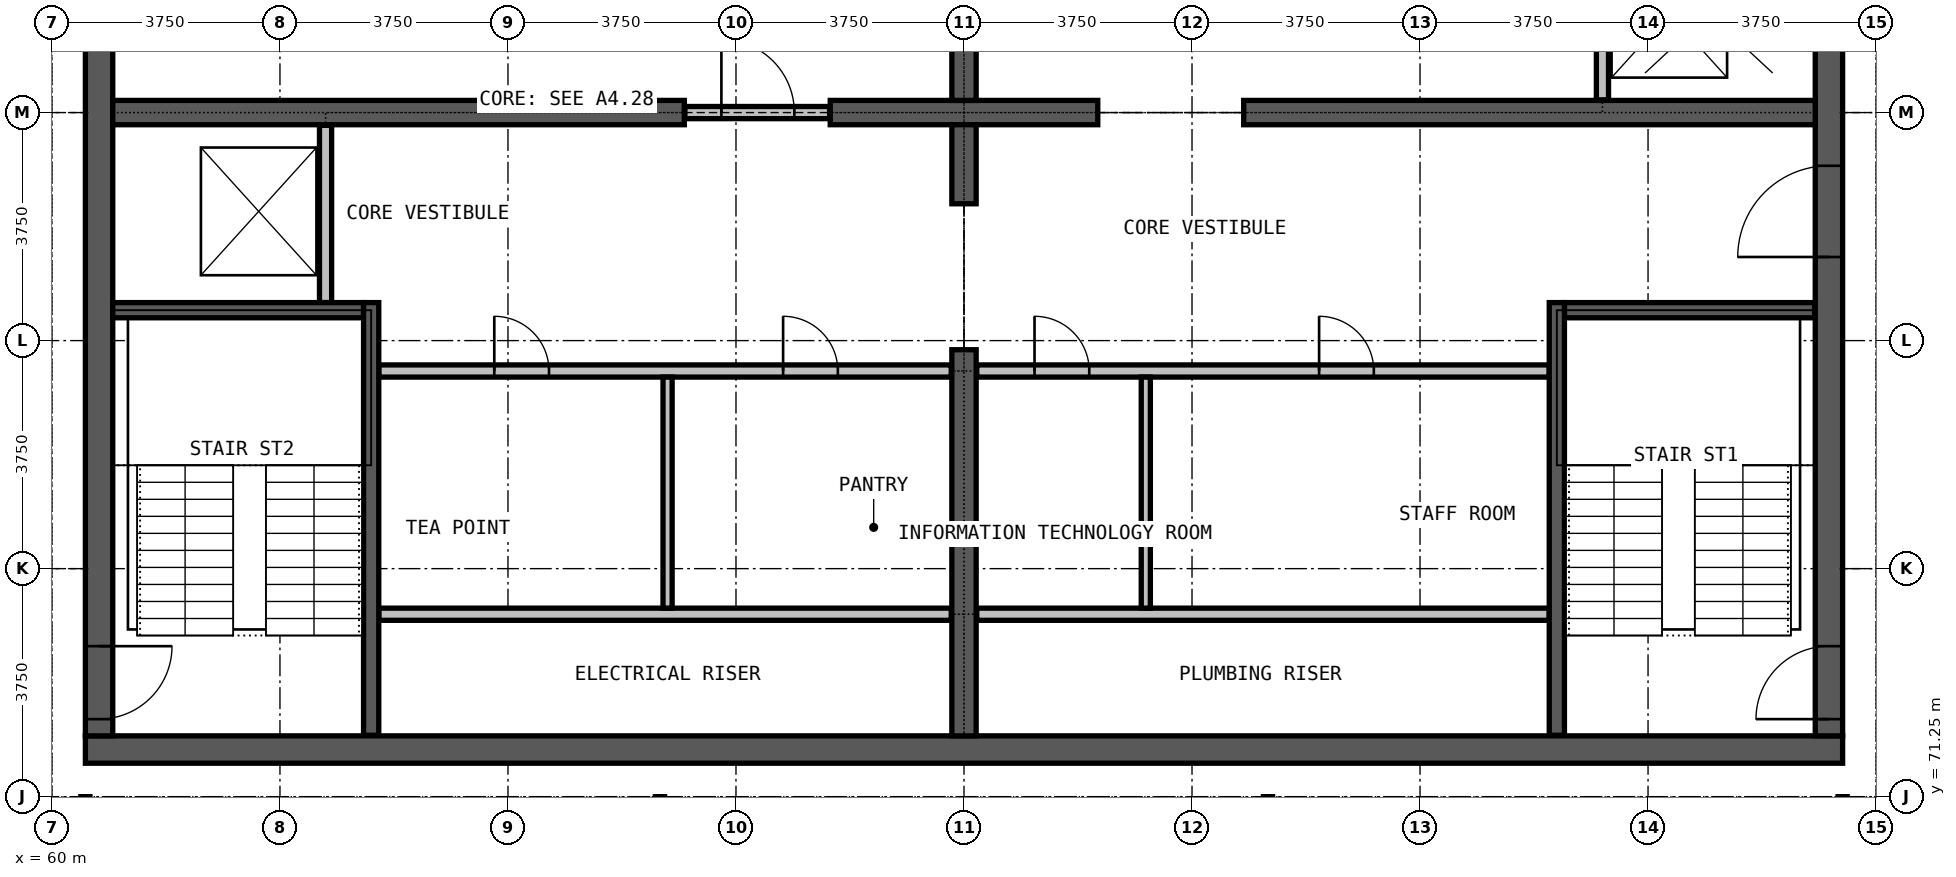
"""IFC4 building model, lengths in metres.
Left out: names, types, materials, properties, quantities, classifications, styles, units other than length and angle.
Written with IfcOpenShell. Run it as: python <this file> out.ifc"""

import sys

from ifc_helpers import new_model, si_unit, direction, frame, frame_2d, origin, place, context, subcontext, project, spatial, rectangle, extrude, element, fill, save


model = new_model("IFC4")
c1 = context("Model", 3, precision=1e-05, world=origin(), true_north=direction((0.0, 1.0)))
c2 = subcontext(c1, "Body", "Model", "MODEL_VIEW")
j1 = project(units=[si_unit("LENGTHUNIT", "METRE"), si_unit("PLANEANGLEUNIT", "RADIAN")], contexts=[c1])
p1 = place(None, origin())
s1 = spatial("IfcSite", under=j1, at=p1, CompositionType="ELEMENT")
p2 = place(p1, origin())
s2 = spatial("IfcBuilding", under=s1, at=p2, CompositionType="ELEMENT")
p3 = place(p2, frame((0.0, 0.0, 269.3)))
s3 = spatial("IfcBuildingStorey", under=s2, at=p3, CompositionType="ELEMENT", Elevation=269.3)
p4 = place(p3, frame((60.55, 72.025, 0.0), z_axis=(0.0, 0.0, 1.0), x_axis=(1.0, 0.0, 0.0)))
e1 = element("IfcWall", 1, at=p4, inside=s3, PredefinedType="SHEAR", context=c2, shape_type="SweptSolid", body=[
    extrude(rectangle(XDim=28.9, YDim=0.45, at=frame_2d((14.45, 0.0))), origin(), (0.0, 0.0, 1.0), 3.6),
])
p5 = place(p3, frame((89.225, 72.25, 0.0), z_axis=(0.0, 0.0, 1.0), x_axis=(0.0, 1.0, 0.0)))
e2 = element("IfcWall", 2, at=p5, inside=s3, PredefinedType="SHEAR", context=c2, shape_type="SweptSolid", body=[
    extrude(rectangle(XDim=20.5, YDim=0.45, at=frame_2d((10.25, 0.0))), origin(), (0.0, 0.0, 1.0), 3.6),
])
p6 = place(p5, frame((0.275, 0.0, 0.0)))
e3 = element("IfcOpeningElement", 3, at=p6, cuts=e2, PredefinedType="OPENING", context=c2, shape_type="SweptSolid", body=[
    extrude(rectangle(XDim=1.2, YDim=2.2, at=frame_2d((0.6, 1.1))), frame((0.0, 0.235, 0.0), z_axis=(0.0, -1.0, 0.0), x_axis=(1.0, 0.0, 0.0)), (0.0, 0.0, 1.0), 0.47),
])
p7 = place(p5, frame((13.775, 0.0, 0.0)))
e4 = element("IfcOpeningElement", 4, at=p7, cuts=e2, PredefinedType="OPENING", context=c2, shape_type="SweptSolid", body=[
    extrude(rectangle(XDim=1.2, YDim=2.2, at=frame_2d((0.6, 1.1))), frame((0.0, 0.235, 0.0), z_axis=(0.0, -1.0, 0.0), x_axis=(1.0, 0.0, 0.0)), (0.0, 0.0, 1.0), 0.47),
])
p8 = place(p5, frame((7.875, 0.0, 0.0)))
e5 = element("IfcOpeningElement", 5, at=p8, cuts=e2, PredefinedType="OPENING", context=c2, shape_type="SweptSolid", body=[
    extrude(rectangle(XDim=1.5, YDim=2.2, at=frame_2d((0.75, 1.1))), frame((0.0, 0.235, 0.0), z_axis=(0.0, -1.0, 0.0), x_axis=(1.0, 0.0, 0.0)), (0.0, 0.0, 1.0), 0.47),
])
p9 = place(p3, frame((60.775, 92.75, 0.0), z_axis=(0.0, 0.0, 1.0), x_axis=(0.0, -1.0, 0.0)))
e6 = element("IfcWall", 6, at=p9, inside=s3, PredefinedType="SHEAR", context=c2, shape_type="SweptSolid", body=[
    extrude(rectangle(XDim=20.5, YDim=0.45, at=frame_2d((10.25, 0.0))), origin(), (0.0, 0.0, 1.0), 3.6),
])
p10 = place(p9, frame((19.025, 0.0, 0.0)))
e7 = element("IfcOpeningElement", 7, at=p10, cuts=e6, PredefinedType="OPENING", context=c2, shape_type="SweptSolid", body=[
    extrude(rectangle(XDim=1.2, YDim=2.2, at=frame_2d((0.6, 1.1))), frame((0.0, 0.235, 0.0), z_axis=(0.0, -1.0, 0.0), x_axis=(1.0, 0.0, 0.0)), (0.0, 0.0, 1.0), 0.47),
])
p11 = place(p9, frame((8.025, 0.0, 0.0)))
e8 = element("IfcOpeningElement", 8, at=p11, cuts=e6, PredefinedType="OPENING", context=c2, shape_type="SweptSolid", body=[
    extrude(rectangle(XDim=1.2, YDim=2.2, at=frame_2d((0.6, 1.1))), frame((0.0, 0.235, 0.0), z_axis=(0.0, -1.0, 0.0), x_axis=(1.0, 0.0, 0.0)), (0.0, 0.0, 1.0), 0.47),
])
p12 = place(p3, frame((61.0, 82.5, 0.0), z_axis=(0.0, 0.0, 1.0), x_axis=(1.0, 0.0, 0.0)))
e9 = element("IfcWall", 9, at=p12, inside=s3, PredefinedType="SHEAR", context=c2, shape_type="SweptSolid", body=[
    extrude(rectangle(XDim=9.4, YDim=0.4, at=frame_2d((4.7, 0.0))), origin(), (0.0, 0.0, 1.0), 3.6),
])
p13 = place(p3, frame((72.8, 82.5, 0.0), z_axis=(0.0, 0.0, 1.0), x_axis=(1.0, 0.0, 0.0)))
e10 = element("IfcWall", 10, at=p13, inside=s3, PredefinedType="SHEAR", context=c2, shape_type="SweptSolid", body=[
    extrude(rectangle(XDim=4.4, YDim=0.4, at=frame_2d((2.2, 0.0))), origin(), (0.0, 0.0, 1.0), 3.6),
])
p14 = place(p3, frame((79.6, 82.5, 0.0), z_axis=(0.0, 0.0, 1.0), x_axis=(1.0, 0.0, 0.0)))
e11 = element("IfcWall", 11, at=p14, inside=s3, PredefinedType="SHEAR", context=c2, shape_type="SweptSolid", body=[
    extrude(rectangle(XDim=9.4, YDim=0.4, at=frame_2d((4.7, 0.0))), origin(), (0.0, 0.0, 1.0), 3.6),
])
p15 = place(p3, frame((75.0, 72.25, 0.0), z_axis=(0.0, 0.0, 1.0), x_axis=(0.0, 1.0, 0.0)))
e12 = element("IfcWall", 12, at=p15, inside=s3, PredefinedType="SHEAR", context=c2, shape_type="SweptSolid", body=[
    extrude(rectangle(XDim=6.35, YDim=0.4, at=frame_2d((3.175, 0.0))), origin(), (0.0, 0.0, 1.0), 3.6),
])
for number, where, z_axis, x_axis in (
    (13, (75.0, 81.0, 0.0), (0.0, 0.0, 1.0), (0.0, 1.0, 0.0)),
    (14, (75.0, 82.7, 0.0), (0.0, 0.0, 1.0), (0.0, 1.0, 0.0)),
):
    element("IfcWall", number, at=place(p3, frame(where, z_axis=z_axis, x_axis=x_axis)), inside=s3, PredefinedType="SHEAR", context=c2, shape_type="SweptSolid", body=[
        extrude(rectangle(XDim=1.3, YDim=0.4, at=frame_2d((0.65, 0.0))), origin(), (0.0, 0.0, 1.0), 3.6),
    ])
for number, where, z_axis, x_axis in (
    (15, (65.375, 74.25, 0.0), (0.0, 0.0, 1.0), (1.0, 0.0, 0.0)),
    (16, (75.21, 74.25, 0.0), (0.0, 0.0, 1.0), (1.0, 0.0, 0.0)),
):
    element("IfcWall", number, at=place(p3, frame(where, z_axis=z_axis, x_axis=x_axis)), inside=s3, PredefinedType="PARTITIONING", context=c2, shape_type="SweptSolid", body=[
        extrude(rectangle(XDim=9.415, YDim=0.2, at=frame_2d((4.708, 0.0))), origin(), (0.0, 0.0, 1.0), 3.3),
    ])
p16 = place(p3, frame((65.375, 78.25, 0.0), z_axis=(0.0, 0.0, 1.0), x_axis=(1.0, 0.0, 0.0)))
e17 = element("IfcWall", 17, at=p16, inside=s3, PredefinedType="PARTITIONING", context=c2, shape_type="SweptSolid", body=[
    extrude(rectangle(XDim=9.415, YDim=0.2, at=frame_2d((4.708, 0.0))), origin(), (0.0, 0.0, 1.0), 3.3),
])
p17 = place(p16, frame((1.9, 0.0, 0.0)))
e18 = element("IfcOpeningElement", 18, at=p17, cuts=e17, PredefinedType="OPENING", context=c2, shape_type="SweptSolid", body=[
    extrude(rectangle(XDim=0.9, YDim=2.2, at=frame_2d((0.45, 1.1))), frame((0.0, 0.11, 0.0), z_axis=(0.0, -1.0, 0.0), x_axis=(1.0, 0.0, 0.0)), (0.0, 0.0, 1.0), 0.22),
])
p18 = place(p16, frame((6.65, 0.0, 0.0)))
e19 = element("IfcOpeningElement", 19, at=p18, cuts=e17, PredefinedType="OPENING", context=c2, shape_type="SweptSolid", body=[
    extrude(rectangle(XDim=0.9, YDim=2.2, at=frame_2d((0.45, 1.1))), frame((0.0, 0.11, 0.0), z_axis=(0.0, -1.0, 0.0), x_axis=(1.0, 0.0, 0.0)), (0.0, 0.0, 1.0), 0.22),
])
p19 = place(p3, frame((75.21, 78.25, 0.0), z_axis=(0.0, 0.0, 1.0), x_axis=(1.0, 0.0, 0.0)))
e20 = element("IfcWall", 20, at=p19, inside=s3, PredefinedType="PARTITIONING", context=c2, shape_type="SweptSolid", body=[
    extrude(rectangle(XDim=9.415, YDim=0.2, at=frame_2d((4.708, 0.0))), origin(), (0.0, 0.0, 1.0), 3.3),
])
p20 = place(p19, frame((0.95, 0.0, 0.0)))
e21 = element("IfcOpeningElement", 21, at=p20, cuts=e20, PredefinedType="OPENING", context=c2, shape_type="SweptSolid", body=[
    extrude(rectangle(XDim=0.9, YDim=2.2, at=frame_2d((0.45, 1.1))), frame((0.0, 0.11, 0.0), z_axis=(0.0, -1.0, 0.0), x_axis=(1.0, 0.0, 0.0)), (0.0, 0.0, 1.0), 0.22),
])
p21 = place(p19, frame((5.63, 0.0, 0.0)))
e22 = element("IfcOpeningElement", 22, at=p21, cuts=e20, PredefinedType="OPENING", context=c2, shape_type="SweptSolid", body=[
    extrude(rectangle(XDim=0.9, YDim=2.2, at=frame_2d((0.45, 1.1))), frame((0.0, 0.11, 0.0), z_axis=(0.0, -1.0, 0.0), x_axis=(1.0, 0.0, 0.0)), (0.0, 0.0, 1.0), 0.22),
])
p22 = place(p3, frame((70.41, 82.5, 0.0), z_axis=(0.0, 0.0, 1.0), x_axis=(1.0, 0.0, 0.0)))
e23 = element("IfcWall", 23, at=p22, inside=s3, PredefinedType="PARTITIONING", context=c2, shape_type="SweptSolid", body=[
    extrude(rectangle(XDim=2.38, YDim=0.2, at=frame_2d((1.19, 0.0))), origin(), (0.0, 0.0, 1.0), 2.4),
])
p23 = place(p22, frame((0.6, 0.0, 0.0)))
e24 = element("IfcOpeningElement", 24, at=p23, cuts=e23, PredefinedType="OPENING", context=c2, shape_type="SweptSolid", body=[
    extrude(rectangle(XDim=1.2, YDim=2.2, at=frame_2d((0.6, 1.1))), frame((0.0, 0.11, 0.0), z_axis=(0.0, -1.0, 0.0), x_axis=(1.0, 0.0, 0.0)), (0.0, 0.0, 1.0), 0.22),
])
p24 = place(p3, frame((60.55, 59.925, 0.0), z_axis=(0.0, 0.0, 1.0), x_axis=(0.0, 1.0, 0.0)))
e25 = element("IfcWall", 25, at=p24, inside=s3, PredefinedType="PARTITIONING", context=c2, shape_type="SweptSolid", body=[
    extrude(rectangle(XDim=11.325, YDim=0.15, at=frame_2d((5.663, 0.0))), origin(), (0.0, 0.0, 1.0), 3.3),
])
p25 = place(p24, frame((5.225, 0.0, 0.0)))
e26 = element("IfcOpeningElement", 26, at=p25, cuts=e25, PredefinedType="OPENING", context=c2, shape_type="SweptSolid", body=[
    extrude(rectangle(XDim=0.9, YDim=2.2, at=frame_2d((0.45, 1.1))), frame((0.0, 0.085, 0.0), z_axis=(0.0, -1.0, 0.0), x_axis=(1.0, 0.0, 0.0)), (0.0, 0.0, 1.0), 0.17),
])
for number, where, z_axis, x_axis in (
    (27, (70.125, 74.35, 0.0), (0.0, 0.0, 1.0), (0.0, 1.0, 0.0)),
    (28, (77.99, 74.35, 0.0), (0.0, 0.0, 1.0), (0.0, 1.0, 0.0)),
):
    element("IfcWall", number, at=place(p3, frame(where, z_axis=z_axis, x_axis=x_axis)), inside=s3, PredefinedType="PARTITIONING", context=c2, shape_type="SweptSolid", body=[
        extrude(rectangle(XDim=3.8, YDim=0.15, at=frame_2d((1.9, 0.0))), origin(), (0.0, 0.0, 1.0), 3.3),
    ])
p26 = place(p3, frame((89.45, 59.925, 0.0), z_axis=(0.0, 0.0, 1.0), x_axis=(0.0, 1.0, 0.0)))
e29 = element("IfcWall", 29, at=p26, inside=s3, PredefinedType="PARTITIONING", context=c2, shape_type="SweptSolid", body=[
    extrude(rectangle(XDim=11.325, YDim=0.15, at=frame_2d((5.663, 0.0))), origin(), (0.0, 0.0, 1.0), 3.3),
])
p27 = place(p26, frame((5.175, 0.0, 0.0)))
e30 = element("IfcOpeningElement", 30, at=p27, cuts=e29, PredefinedType="OPENING", context=c2, shape_type="SweptSolid", body=[
    extrude(rectangle(XDim=1.0, YDim=2.2, at=frame_2d((0.5, 1.1))), frame((0.0, 0.085, 0.0), z_axis=(0.0, -1.0, 0.0), x_axis=(1.0, 0.0, 0.0)), (0.0, 0.0, 1.0), 0.17),
])
for number, where, z_axis, x_axis in (
    (31, (64.5, 79.375, 0.0), (0.0, 0.0, 1.0), (0.0, 1.0, 0.0)),
    (32, (85.5, 82.71, 0.0), (0.0, 0.0, 1.0), (0.0, 1.0, 0.0)),
):
    element("IfcWall", number, at=place(p3, frame(where, z_axis=z_axis, x_axis=x_axis)), inside=s3, PredefinedType="PARTITIONING", context=c2, shape_type="SweptSolid", body=[
        extrude(rectangle(XDim=2.915, YDim=0.2, at=frame_2d((1.458, 0.0))), origin(), (0.0, 0.0, 1.0), 3.3),
    ])
p28 = place(p3, frame((61.0, 79.25, 0.0), z_axis=(0.0, 0.0, 1.0), x_axis=(1.0, 0.0, 0.0)))
e33 = element("IfcWall", 33, at=p28, inside=s3, PredefinedType="PARTITIONING", context=c2, shape_type="SweptSolid", body=[
    extrude(rectangle(XDim=4.125, YDim=0.25, at=frame_2d((2.062, 0.0))), origin(), (0.0, 0.0, 1.0), 3.3),
])
p29 = place(p3, frame((84.875, 79.25, 0.0), z_axis=(0.0, 0.0, 1.0), x_axis=(1.0, 0.0, 0.0)))
e34 = element("IfcWall", 34, at=p29, inside=s3, PredefinedType="PARTITIONING", context=c2, shape_type="SweptSolid", body=[
    extrude(rectangle(XDim=4.115, YDim=0.25, at=frame_2d((2.058, 0.0))), origin(), (0.0, 0.0, 1.0), 3.3),
])
for number, where, z_axis, x_axis in (
    (35, (65.25, 72.26, 0.0), (0.0, 0.0, 1.0), (0.0, 1.0, 0.0)),
    (36, (84.75, 72.26, 0.0), (0.0, 0.0, 1.0), (0.0, 1.0, 0.0)),
):
    element("IfcWall", number, at=place(p3, frame(where, z_axis=z_axis, x_axis=x_axis)), inside=s3, PredefinedType="PARTITIONING", context=c2, shape_type="SweptSolid", body=[
        extrude(rectangle(XDim=7.115, YDim=0.25, at=frame_2d((3.558, 0.0))), origin(), (0.0, 0.0, 1.0), 3.3),
    ])
p30 = place(p23, origin())
e37 = element("IfcDoor", 37, at=p30, inside=s3, OperationType="SINGLE_SWING_RIGHT", PredefinedType="DOOR", context=c2, shape_type="SweptSolid", body=[
    extrude(rectangle(XDim=1.2, YDim=2.2, at=frame_2d((0.6, 1.1))), frame((0.0, 0.025, 0.0), z_axis=(0.0, -1.0, 0.0), x_axis=(1.0, 0.0, 0.0)), (0.0, 0.0, 1.0), 0.05),
])
fill(e24, e37)
p31 = place(p6, origin())
e38 = element("IfcDoor", 38, at=p31, inside=s3, OperationType="SINGLE_SWING_LEFT", PredefinedType="DOOR", context=c2, shape_type="SweptSolid", body=[
    extrude(rectangle(XDim=1.2, YDim=2.2, at=frame_2d((0.6, 1.1))), frame((0.0, 0.025, 0.0), z_axis=(0.0, -1.0, 0.0), x_axis=(1.0, 0.0, 0.0)), (0.0, 0.0, 1.0), 0.05),
])
fill(e3, e38)
p32 = place(p10, origin())
e39 = element("IfcDoor", 39, at=p32, inside=s3, OperationType="SINGLE_SWING_LEFT", PredefinedType="DOOR", context=c2, shape_type="SweptSolid", body=[
    extrude(rectangle(XDim=1.2, YDim=2.2, at=frame_2d((0.6, 1.1))), frame((0.0, 0.025, 0.0), z_axis=(0.0, -1.0, 0.0), x_axis=(1.0, 0.0, 0.0)), (0.0, 0.0, 1.0), 0.05),
])
fill(e7, e39)
p33 = place(p8, origin())
e40 = element("IfcDoor", 40, at=p33, inside=s3, OperationType="DOUBLE_DOOR_SINGLE_SWING", PredefinedType="DOOR", context=c2, shape_type="SweptSolid", body=[
    extrude(rectangle(XDim=1.5, YDim=2.2, at=frame_2d((0.75, 1.1))), frame((0.0, 0.025, 0.0), z_axis=(0.0, -1.0, 0.0), x_axis=(1.0, 0.0, 0.0)), (0.0, 0.0, 1.0), 0.05),
])
fill(e5, e40)
p34 = place(p17, origin())
e41 = element("IfcDoor", 41, at=p34, inside=s3, OperationType="SINGLE_SWING_LEFT", PredefinedType="DOOR", context=c2, shape_type="SweptSolid", body=[
    extrude(rectangle(XDim=0.9, YDim=2.2, at=frame_2d((0.45, 1.1))), frame((0.0, 0.025, 0.0), z_axis=(0.0, -1.0, 0.0), x_axis=(1.0, 0.0, 0.0)), (0.0, 0.0, 1.0), 0.05),
])
fill(e18, e41)
p35 = place(p18, origin())
e42 = element("IfcDoor", 42, at=p35, inside=s3, OperationType="SINGLE_SWING_LEFT", PredefinedType="DOOR", context=c2, shape_type="SweptSolid", body=[
    extrude(rectangle(XDim=0.9, YDim=2.2, at=frame_2d((0.45, 1.1))), frame((0.0, 0.025, 0.0), z_axis=(0.0, -1.0, 0.0), x_axis=(1.0, 0.0, 0.0)), (0.0, 0.0, 1.0), 0.05),
])
fill(e19, e42)
p36 = place(p20, origin())
e43 = element("IfcDoor", 43, at=p36, inside=s3, OperationType="SINGLE_SWING_LEFT", PredefinedType="DOOR", context=c2, shape_type="SweptSolid", body=[
    extrude(rectangle(XDim=0.9, YDim=2.2, at=frame_2d((0.45, 1.1))), frame((0.0, 0.025, 0.0), z_axis=(0.0, -1.0, 0.0), x_axis=(1.0, 0.0, 0.0)), (0.0, 0.0, 1.0), 0.05),
])
fill(e21, e43)
p37 = place(p21, origin())
e44 = element("IfcDoor", 44, at=p37, inside=s3, OperationType="SINGLE_SWING_LEFT", PredefinedType="DOOR", context=c2, shape_type="SweptSolid", body=[
    extrude(rectangle(XDim=0.9, YDim=2.2, at=frame_2d((0.45, 1.1))), frame((0.0, 0.025, 0.0), z_axis=(0.0, -1.0, 0.0), x_axis=(1.0, 0.0, 0.0)), (0.0, 0.0, 1.0), 0.05),
])
fill(e22, e44)
save(model, sys.argv[1])
